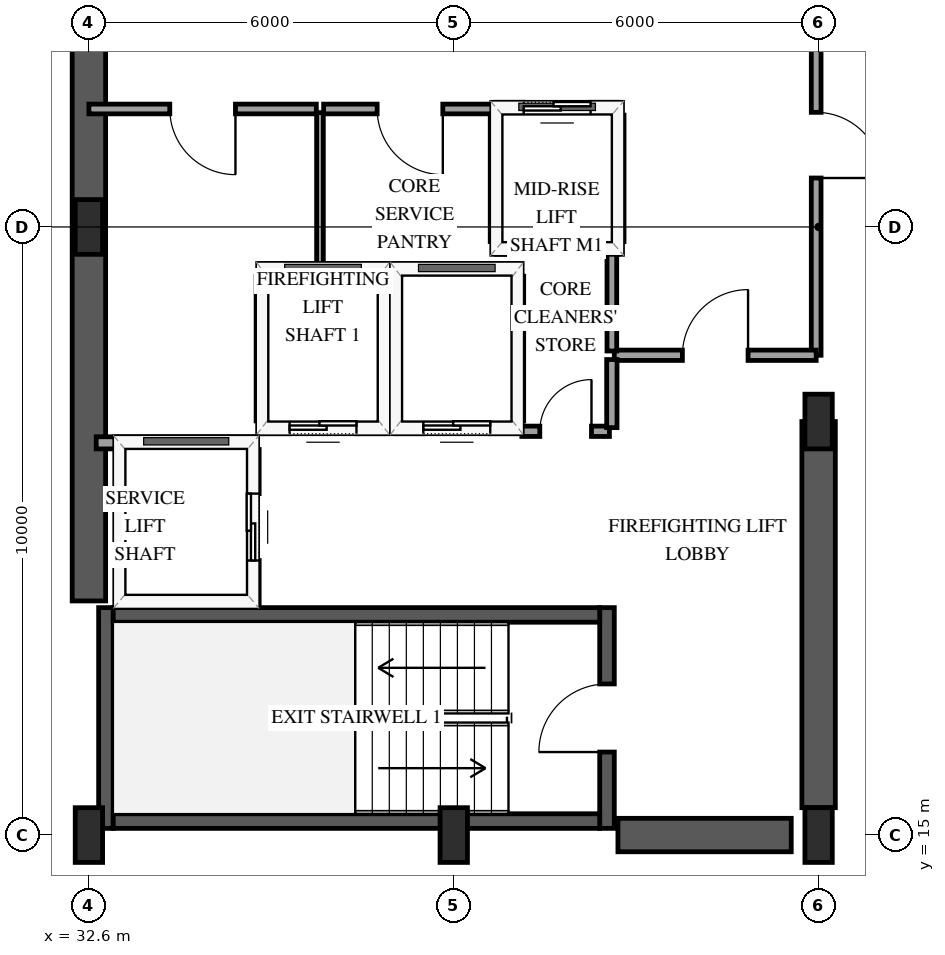
"""IFC4 building model, lengths in metres.
Left out: names, types, materials, properties, quantities, classifications, styles, units other than length and angle.
Written with IfcOpenShell. Run it as: python <this file> out.ifc"""

import sys

from ifc_helpers import new_model, si_unit, direction, frame, frame_2d, origin, origin_2d, place, context, subcontext, project, spatial, rectangle, extrude, element, fill, save


model = new_model("IFC4")
c1 = context("Model", 3, precision=1e-05, world=origin(), true_north=direction((0.0, 1.0)))
c2 = subcontext(c1, "Body", "Model", "MODEL_VIEW")
j1 = project(units=[si_unit("LENGTHUNIT", "METRE"), si_unit("PLANEANGLEUNIT", "RADIAN")], contexts=[c1])
p1 = place(None, origin())
s1 = spatial("IfcSite", under=j1, at=p1, CompositionType="ELEMENT")
p2 = place(p1, origin())
s2 = spatial("IfcBuilding", under=s1, at=p2, CompositionType="ELEMENT")
p3 = place(p2, frame((0.0, 0.0, 175.0)))
s3 = spatial("IfcBuildingStorey", under=s2, at=p3, CompositionType="ELEMENT", Elevation=175.0)
p4 = place(p3, frame((32.88, 15.11, 0.0), z_axis=(0.0, 0.0, 1.0), x_axis=(0.0, 1.0, 0.0)))
e1 = element("IfcWall", 1, at=p4, inside=s3, PredefinedType="SHEAR", context=c2, shape_type="SweptSolid", body=[
    extrude(rectangle(XDim=3.63, YDim=0.24, at=frame_2d((1.815, 0.0))), origin(), (0.0, 0.0, 1.0), 3.6),
])
p5 = place(p3, frame((41.12, 15.11, 0.0), z_axis=(0.0, 0.0, 1.0), x_axis=(0.0, 1.0, 0.0)))
e2 = element("IfcWall", 2, at=p5, inside=s3, PredefinedType="SHEAR", context=c2, shape_type="SweptSolid", body=[
    extrude(rectangle(XDim=3.63, YDim=0.24, at=frame_2d((1.815, 0.0))), origin(), (0.0, 0.0, 1.0), 3.6),
])
p6 = place(p5, frame((1.255, 0.0, 0.0)))
e3 = element("IfcOpeningElement", 3, at=p6, cuts=e2, PredefinedType="OPENING", context=c2, shape_type="SweptSolid", body=[
    extrude(rectangle(XDim=1.12, YDim=2.15, at=frame_2d((0.56, 1.075))), frame((0.0, 0.13, 0.0), z_axis=(0.0, -1.0, 0.0), x_axis=(1.0, 0.0, 0.0)), (0.0, 0.0, 1.0), 0.26),
])
for number, where, z_axis, x_axis in (
    (4, (33.0, 15.23, 0.0), (0.0, 0.0, 1.0), (1.0, 0.0, 0.0)),
    (5, (33.0, 18.62, 0.0), (0.0, 0.0, 1.0), (1.0, 0.0, 0.0)),
):
    element("IfcWall", number, at=place(p3, frame(where, z_axis=z_axis, x_axis=x_axis)), inside=s3, PredefinedType="SHEAR", context=c2, shape_type="SweptSolid", body=[
        extrude(rectangle(XDim=8.0, YDim=0.24, at=frame_2d((4.0, 0.0))), origin(), (0.0, 0.0, 1.0), 3.6),
    ])
p7 = place(p3, frame((32.6, 18.85, 0.0), z_axis=(0.0, 0.0, 1.0), x_axis=(0.0, 1.0, 0.0)))
e6 = element("IfcWall", 6, at=p7, inside=s3, PredefinedType="SHEAR", context=c2, shape_type="SweptSolid", body=[
    extrude(rectangle(XDim=12.3, YDim=0.55, at=frame_2d((6.15, 0.0))), origin(), (0.0, 0.0, 1.0), 3.6),
])
p8 = place(p3, frame((41.3, 15.0, 0.0), z_axis=(0.0, 0.0, 1.0), x_axis=(1.0, 0.0, 0.0)))
e7 = element("IfcWall", 7, at=p8, inside=s3, PredefinedType="SHEAR", context=c2, shape_type="SweptSolid", body=[
    extrude(rectangle(XDim=2.85, YDim=0.55, at=frame_2d((1.425, 0.0))), origin(), (0.0, 0.0, 1.0), 3.6),
])
p9 = place(p3, frame((44.6, 15.45, 0.0), z_axis=(0.0, 0.0, 1.0), x_axis=(0.0, 1.0, 0.0)))
e8 = element("IfcWall", 8, at=p9, inside=s3, PredefinedType="SHEAR", context=c2, shape_type="SweptSolid", body=[
    extrude(rectangle(XDim=6.35, YDim=0.55, at=frame_2d((3.175, 0.0))), origin(), (0.0, 0.0, 1.0), 3.6),
])
for number, where, z_axis, x_axis in (
    (9, (32.6, 15.0, 0.0), (0.0, 0.0, 1.0), (1.0, 0.0, 0.0)),
    (10, (32.6, 25.0, 0.0), (0.0, 0.0, 1.0), (1.0, 0.0, 0.0)),
    (11, (38.6, 15.0, 0.0), (0.0, 0.0, 1.0), (1.0, 0.0, 0.0)),
    (12, (44.6, 15.0, 0.0), (0.0, 0.0, 1.0), (1.0, 0.0, 0.0)),
    (13, (44.6, 21.8, 0.0), (0.0, 0.0, 1.0), (1.0, 0.0, 0.0)),
):
    element("IfcColumn", number, at=place(p3, frame(where, z_axis=z_axis, x_axis=x_axis)), inside=s3, PredefinedType="PILASTER", context=c2, shape_type="SweptSolid", body=[
        extrude(rectangle(XDim=0.45, YDim=0.9, at=origin_2d()), origin(), (0.0, 0.0, 1.0), 3.6),
    ])
p10 = place(p3, frame((35.45, 21.7, 0.0), z_axis=(0.0, 0.0, 1.0), x_axis=(1.0, 0.0, 0.0)))
e14 = element("IfcWall", 14, at=p10, inside=s3, PredefinedType="SOLIDWALL", context=c2, shape_type="SweptSolid", body=[
    extrude(rectangle(XDim=2.0, YDim=0.2, at=frame_2d((1.0, 0.0))), origin(), (0.0, 0.0, 1.0), 3.3),
])
p11 = place(p10, frame((0.45, 0.0, 0.0)))
e15 = element("IfcOpeningElement", 15, at=p11, cuts=e14, PredefinedType="OPENING", context=c2, shape_type="SweptSolid", body=[
    extrude(rectangle(XDim=1.1, YDim=2.15, at=frame_2d((0.55, 1.075))), frame((0.0, 0.11, 0.0), z_axis=(0.0, -1.0, 0.0), x_axis=(1.0, 0.0, 0.0)), (0.0, 0.0, 1.0), 0.22),
])
p12 = place(p3, frame((35.45, 24.3, 0.0), z_axis=(0.0, 0.0, 1.0), x_axis=(1.0, 0.0, 0.0)))
e16 = element("IfcWall", 16, at=p12, inside=s3, PredefinedType="SOLIDWALL", context=c2, shape_type="SweptSolid", body=[
    extrude(rectangle(XDim=2.0, YDim=0.2, at=frame_2d((1.0, 0.0))), origin(), (0.0, 0.0, 1.0), 3.3),
])
for number, where, z_axis, x_axis in (
    (17, (35.45, 21.81, 0.0), (0.0, 0.0, 1.0), (0.0, 1.0, 0.0)),
    (18, (37.45, 21.81, 0.0), (0.0, 0.0, 1.0), (0.0, 1.0, 0.0)),
):
    element("IfcWall", number, at=place(p3, frame(where, z_axis=z_axis, x_axis=x_axis)), inside=s3, PredefinedType="SOLIDWALL", context=c2, shape_type="SweptSolid", body=[
        extrude(rectangle(XDim=2.38, YDim=0.2, at=frame_2d((1.19, 0.0))), origin(), (0.0, 0.0, 1.0), 3.3),
    ])
p13 = place(p3, frame((37.65, 21.7, 0.0), z_axis=(0.0, 0.0, 1.0), x_axis=(1.0, 0.0, 0.0)))
e19 = element("IfcWall", 19, at=p13, inside=s3, PredefinedType="SOLIDWALL", context=c2, shape_type="SweptSolid", body=[
    extrude(rectangle(XDim=2.0, YDim=0.2, at=frame_2d((1.0, 0.0))), origin(), (0.0, 0.0, 1.0), 3.3),
])
p14 = place(p13, frame((0.45, 0.0, 0.0)))
e20 = element("IfcOpeningElement", 20, at=p14, cuts=e19, PredefinedType="OPENING", context=c2, shape_type="SweptSolid", body=[
    extrude(rectangle(XDim=1.1, YDim=2.15, at=frame_2d((0.55, 1.075))), frame((0.0, 0.11, 0.0), z_axis=(0.0, -1.0, 0.0), x_axis=(1.0, 0.0, 0.0)), (0.0, 0.0, 1.0), 0.22),
])
p15 = place(p3, frame((37.65, 24.3, 0.0), z_axis=(0.0, 0.0, 1.0), x_axis=(1.0, 0.0, 0.0)))
e21 = element("IfcWall", 21, at=p15, inside=s3, PredefinedType="SOLIDWALL", context=c2, shape_type="SweptSolid", body=[
    extrude(rectangle(XDim=2.0, YDim=0.2, at=frame_2d((1.0, 0.0))), origin(), (0.0, 0.0, 1.0), 3.3),
])
p16 = place(p3, frame((39.65, 21.81, 0.0), z_axis=(0.0, 0.0, 1.0), x_axis=(0.0, 1.0, 0.0)))
e22 = element("IfcWall", 22, at=p16, inside=s3, PredefinedType="SOLIDWALL", context=c2, shape_type="SweptSolid", body=[
    extrude(rectangle(XDim=2.38, YDim=0.2, at=frame_2d((1.19, 0.0))), origin(), (0.0, 0.0, 1.0), 3.3),
])
p17 = place(p3, frame((32.72, 21.45, 0.0), z_axis=(0.0, 0.0, 1.0), x_axis=(1.0, 0.0, 0.0)))
e23 = element("IfcWall", 23, at=p17, inside=s3, PredefinedType="SOLIDWALL", context=c2, shape_type="SweptSolid", body=[
    extrude(rectangle(XDim=2.58, YDim=0.2, at=frame_2d((1.29, 0.0))), origin(), (0.0, 0.0, 1.0), 3.3),
])
p18 = place(p3, frame((35.3, 18.79, 0.0), z_axis=(0.0, 0.0, 1.0), x_axis=(0.0, 1.0, 0.0)))
e24 = element("IfcWall", 24, at=p18, inside=s3, PredefinedType="SOLIDWALL", context=c2, shape_type="SweptSolid", body=[
    extrude(rectangle(XDim=2.55, YDim=0.2, at=frame_2d((1.275, 0.0))), origin(), (0.0, 0.0, 1.0), 3.3),
])
p19 = place(p18, frame((0.725, 0.0, 0.0)))
e25 = element("IfcOpeningElement", 25, at=p19, cuts=e24, PredefinedType="OPENING", context=c2, shape_type="SweptSolid", body=[
    extrude(rectangle(XDim=1.1, YDim=2.15, at=frame_2d((0.55, 1.075))), frame((0.0, 0.11, 0.0), z_axis=(0.0, -1.0, 0.0), x_axis=(1.0, 0.0, 0.0)), (0.0, 0.0, 1.0), 0.22),
])
p20 = place(p3, frame((39.3, 24.65, 0.0), z_axis=(0.0, 0.0, 1.0), x_axis=(1.0, 0.0, 0.0)))
e26 = element("IfcWall", 26, at=p20, inside=s3, PredefinedType="SOLIDWALL", context=c2, shape_type="SweptSolid", body=[
    extrude(rectangle(XDim=2.0, YDim=0.2, at=frame_2d((1.0, 0.0))), origin(), (0.0, 0.0, 1.0), 3.3),
])
p21 = place(p3, frame((39.3, 26.95, 0.0), z_axis=(0.0, 0.0, 1.0), x_axis=(1.0, 0.0, 0.0)))
e27 = element("IfcWall", 27, at=p21, inside=s3, PredefinedType="SOLIDWALL", context=c2, shape_type="SweptSolid", body=[
    extrude(rectangle(XDim=2.0, YDim=0.2, at=frame_2d((1.0, 0.0))), origin(), (0.0, 0.0, 1.0), 3.3),
])
p22 = place(p21, frame((0.45, 0.0, 0.0)))
e28 = element("IfcOpeningElement", 28, at=p22, cuts=e27, PredefinedType="OPENING", context=c2, shape_type="SweptSolid", body=[
    extrude(rectangle(XDim=1.1, YDim=2.15, at=frame_2d((0.55, 1.075))), frame((0.0, 0.11, 0.0), z_axis=(0.0, -1.0, 0.0), x_axis=(1.0, 0.0, 0.0)), (0.0, 0.0, 1.0), 0.22),
])
for number, where, z_axis, x_axis in (
    (29, (39.3, 24.76, 0.0), (0.0, 0.0, 1.0), (0.0, 1.0, 0.0)),
    (30, (41.3, 24.76, 0.0), (0.0, 0.0, 1.0), (0.0, 1.0, 0.0)),
):
    element("IfcWall", number, at=place(p3, frame(where, z_axis=z_axis, x_axis=x_axis)), inside=s3, PredefinedType="SOLIDWALL", context=c2, shape_type="SweptSolid", body=[
        extrude(rectangle(XDim=2.08, YDim=0.2, at=frame_2d((1.04, 0.0))), origin(), (0.0, 0.0, 1.0), 3.3),
    ])
p23 = place(p3, frame((44.56, 29.8, 0.0), z_axis=(0.0, 0.0, 1.0), x_axis=(0.0, -1.0, 0.0)))
e31 = element("IfcWall", 31, at=p23, inside=s3, PredefinedType="PARTITIONING", context=c2, shape_type="SweptSolid", body=[
    extrude(rectangle(XDim=6.91, YDim=0.16, at=frame_2d((3.455, 0.0))), origin(), (0.0, 0.0, 1.0), 2.34),
])
p24 = place(p23, frame((2.915, 0.0, 0.0)))
e32 = element("IfcOpeningElement", 32, at=p24, cuts=e31, PredefinedType="OPENING", context=c2, shape_type="SweptSolid", body=[
    extrude(rectangle(XDim=1.08, YDim=2.15, at=frame_2d((0.54, 1.075))), frame((0.0, 0.09, 0.0), z_axis=(0.0, -1.0, 0.0), x_axis=(1.0, 0.0, 0.0)), (0.0, 0.0, 1.0), 0.18),
])
p25 = place(p3, frame((36.34, 26.94, 0.0), z_axis=(0.0, 0.0, 1.0), x_axis=(-1.0, 0.0, 0.0)))
e33 = element("IfcWall", 33, at=p25, inside=s3, PredefinedType="PARTITIONING", context=c2, shape_type="SweptSolid", body=[
    extrude(rectangle(XDim=3.74, YDim=0.16, at=frame_2d((1.87, 0.0))), origin(), (0.0, 0.0, 1.0), 3.3),
])
p26 = place(p25, frame((1.33, 0.0, 0.0)))
e34 = element("IfcOpeningElement", 34, at=p26, cuts=e33, PredefinedType="OPENING", context=c2, shape_type="SweptSolid", body=[
    extrude(rectangle(XDim=1.08, YDim=2.15, at=frame_2d((0.54, 1.075))), frame((0.0, 0.09, 0.0), z_axis=(0.0, -1.0, 0.0), x_axis=(1.0, 0.0, 0.0)), (0.0, 0.0, 1.0), 0.18),
])
p27 = place(p3, frame((41.24, 22.89, 0.0), z_axis=(0.0, 0.0, 1.0), x_axis=(1.0, 0.0, 0.0)))
e35 = element("IfcWall", 35, at=p27, inside=s3, PredefinedType="PARTITIONING", context=c2, shape_type="SweptSolid", body=[
    extrude(rectangle(XDim=3.32, YDim=0.17, at=frame_2d((1.66, 0.0))), origin(), (0.0, 0.0, 1.0), 3.3),
])
p28 = place(p27, frame((1.12, 0.0, 0.0)))
e36 = element("IfcOpeningElement", 36, at=p28, cuts=e35, PredefinedType="OPENING", context=c2, shape_type="SweptSolid", body=[
    extrude(rectangle(XDim=1.08, YDim=2.15, at=frame_2d((0.54, 1.075))), frame((0.0, 0.095, 0.0), z_axis=(0.0, -1.0, 0.0), x_axis=(1.0, 0.0, 0.0)), (0.0, 0.0, 1.0), 0.19),
])
p29 = place(p3, frame((39.3, 26.94, 0.0), z_axis=(0.0, 0.0, 1.0), x_axis=(-1.0, 0.0, 0.0)))
e37 = element("IfcWall", 37, at=p29, inside=s3, PredefinedType="PARTITIONING", context=c2, shape_type="SweptSolid", body=[
    extrude(rectangle(XDim=2.84, YDim=0.16, at=frame_2d((1.42, 0.0))), origin(), (0.0, 0.0, 1.0), 3.3),
])
p30 = place(p29, frame((0.88, 0.0, 0.0)))
e38 = element("IfcOpeningElement", 38, at=p30, cuts=e37, PredefinedType="OPENING", context=c2, shape_type="SweptSolid", body=[
    extrude(rectangle(XDim=1.08, YDim=2.15, at=frame_2d((0.54, 1.075))), frame((0.0, 0.09, 0.0), z_axis=(0.0, -1.0, 0.0), x_axis=(1.0, 0.0, 0.0)), (0.0, 0.0, 1.0), 0.18),
])
p31 = place(p3, frame((36.4, 26.88, 0.0), z_axis=(0.0, 0.0, 1.0), x_axis=(0.0, -1.0, 0.0)))
e39 = element("IfcWall", 39, at=p31, inside=s3, PredefinedType="PARTITIONING", context=c2, shape_type="SweptSolid", body=[
    extrude(rectangle(XDim=2.58, YDim=0.11, at=frame_2d((1.29, 0.0))), origin(), (0.0, 0.0, 1.0), 3.3),
])
p32 = place(p3, frame((41.2, 22.96, 0.0), z_axis=(0.0, 0.0, 1.0), x_axis=(0.0, 1.0, 0.0)))
e40 = element("IfcWall", 40, at=p32, inside=s3, PredefinedType="PARTITIONING", context=c2, shape_type="SweptSolid", body=[
    extrude(rectangle(XDim=1.69, YDim=0.16, at=frame_2d((0.845, 0.0))), origin(), (0.0, 0.0, 1.0), 3.3),
])
p33 = place(p3, frame((39.72, 21.64, 0.0), z_axis=(0.0, 0.0, 1.0), x_axis=(1.0, 0.0, 0.0)))
e41 = element("IfcWall", 41, at=p33, inside=s3, PredefinedType="PARTITIONING", context=c2, shape_type="SweptSolid", body=[
    extrude(rectangle(XDim=1.44, YDim=0.17, at=frame_2d((0.72, 0.0))), origin(), (0.0, 0.0, 1.0), 3.3),
])
p34 = place(p33, frame((0.295, 0.0, 0.0)))
e42 = element("IfcOpeningElement", 42, at=p34, cuts=e41, PredefinedType="OPENING", context=c2, shape_type="SweptSolid", body=[
    extrude(rectangle(XDim=0.85, YDim=2.1, at=frame_2d((0.425, 1.05))), frame((0.0, 0.095, 0.0), z_axis=(0.0, -1.0, 0.0), x_axis=(1.0, 0.0, 0.0)), (0.0, 0.0, 1.0), 0.19),
])
p35 = place(p3, frame((41.2, 21.7, 0.0), z_axis=(0.0, 0.0, 1.0), x_axis=(0.0, 1.0, 0.0)))
e43 = element("IfcWall", 43, at=p35, inside=s3, PredefinedType="PARTITIONING", context=c2, shape_type="SweptSolid", body=[
    extrude(rectangle(XDim=1.12, YDim=0.17, at=frame_2d((0.56, 0.0))), origin(), (0.0, 0.0, 1.0), 3.3),
])
p36 = place(p11, origin())
e44 = element("IfcDoor", 44, at=p36, inside=s3, OperationType="SLIDING_TO_LEFT", PredefinedType="DOOR", context=c2, shape_type="SweptSolid", body=[
    extrude(rectangle(XDim=1.1, YDim=2.15, at=frame_2d((0.55, 1.075))), frame((0.0, 0.025, 0.0), z_axis=(0.0, -1.0, 0.0), x_axis=(1.0, 0.0, 0.0)), (0.0, 0.0, 1.0), 0.05),
])
fill(e15, e44)
p37 = place(p14, origin())
e45 = element("IfcDoor", 45, at=p37, inside=s3, OperationType="SLIDING_TO_LEFT", PredefinedType="DOOR", context=c2, shape_type="SweptSolid", body=[
    extrude(rectangle(XDim=1.1, YDim=2.15, at=frame_2d((0.55, 1.075))), frame((0.0, 0.025, 0.0), z_axis=(0.0, -1.0, 0.0), x_axis=(1.0, 0.0, 0.0)), (0.0, 0.0, 1.0), 0.05),
])
fill(e20, e45)
p38 = place(p19, origin())
e46 = element("IfcDoor", 46, at=p38, inside=s3, OperationType="SLIDING_TO_LEFT", PredefinedType="DOOR", context=c2, shape_type="SweptSolid", body=[
    extrude(rectangle(XDim=1.1, YDim=2.15, at=frame_2d((0.55, 1.075))), frame((0.0, 0.025, 0.0), z_axis=(0.0, -1.0, 0.0), x_axis=(1.0, 0.0, 0.0)), (0.0, 0.0, 1.0), 0.05),
])
fill(e25, e46)
p39 = place(p22, origin())
e47 = element("IfcDoor", 47, at=p39, inside=s3, OperationType="SLIDING_TO_LEFT", PredefinedType="DOOR", context=c2, shape_type="SweptSolid", body=[
    extrude(rectangle(XDim=1.1, YDim=2.15, at=frame_2d((0.55, 1.075))), frame((0.0, 0.025, 0.0), z_axis=(0.0, -1.0, 0.0), x_axis=(1.0, 0.0, 0.0)), (0.0, 0.0, 1.0), 0.05),
])
fill(e28, e47)
p40 = place(p6, origin())
e48 = element("IfcDoor", 48, at=p40, inside=s3, OperationType="SINGLE_SWING_LEFT", PredefinedType="DOOR", context=c2, shape_type="SweptSolid", body=[
    extrude(rectangle(XDim=1.12, YDim=2.15, at=frame_2d((0.56, 1.075))), frame((0.0, 0.025, 0.0), z_axis=(0.0, -1.0, 0.0), x_axis=(1.0, 0.0, 0.0)), (0.0, 0.0, 1.0), 0.05),
])
fill(e3, e48)
p41 = place(p24, origin())
e49 = element("IfcDoor", 49, at=p41, inside=s3, OperationType="SINGLE_SWING_RIGHT", PredefinedType="DOOR", context=c2, shape_type="SweptSolid", body=[
    extrude(rectangle(XDim=1.08, YDim=2.15, at=frame_2d((0.54, 1.075))), frame((0.0, 0.025, 0.0), z_axis=(0.0, -1.0, 0.0), x_axis=(1.0, 0.0, 0.0)), (0.0, 0.0, 1.0), 0.05),
])
fill(e32, e49)
p42 = place(p26, origin())
e50 = element("IfcDoor", 50, at=p42, inside=s3, OperationType="SINGLE_SWING_LEFT", PredefinedType="DOOR", context=c2, shape_type="SweptSolid", body=[
    extrude(rectangle(XDim=1.08, YDim=2.15, at=frame_2d((0.54, 1.075))), frame((0.0, 0.025, 0.0), z_axis=(0.0, -1.0, 0.0), x_axis=(1.0, 0.0, 0.0)), (0.0, 0.0, 1.0), 0.05),
])
fill(e34, e50)
p43 = place(p28, origin())
e51 = element("IfcDoor", 51, at=p43, inside=s3, OperationType="SINGLE_SWING_RIGHT", PredefinedType="DOOR", context=c2, shape_type="SweptSolid", body=[
    extrude(rectangle(XDim=1.08, YDim=2.15, at=frame_2d((0.54, 1.075))), frame((0.0, 0.025, 0.0), z_axis=(0.0, -1.0, 0.0), x_axis=(1.0, 0.0, 0.0)), (0.0, 0.0, 1.0), 0.05),
])
fill(e36, e51)
p44 = place(p30, origin())
e52 = element("IfcDoor", 52, at=p44, inside=s3, OperationType="SINGLE_SWING_LEFT", PredefinedType="DOOR", context=c2, shape_type="SweptSolid", body=[
    extrude(rectangle(XDim=1.08, YDim=2.15, at=frame_2d((0.54, 1.075))), frame((0.0, 0.025, 0.0), z_axis=(0.0, -1.0, 0.0), x_axis=(1.0, 0.0, 0.0)), (0.0, 0.0, 1.0), 0.05),
])
fill(e38, e52)
p45 = place(p34, origin())
e53 = element("IfcDoor", 53, at=p45, inside=s3, OperationType="SINGLE_SWING_RIGHT", PredefinedType="DOOR", context=c2, shape_type="SweptSolid", body=[
    extrude(rectangle(XDim=0.85, YDim=2.1, at=frame_2d((0.425, 1.05))), frame((0.0, 0.025, 0.0), z_axis=(0.0, -1.0, 0.0), x_axis=(1.0, 0.0, 0.0)), (0.0, 0.0, 1.0), 0.05),
])
fill(e42, e53)
save(model, sys.argv[1])
